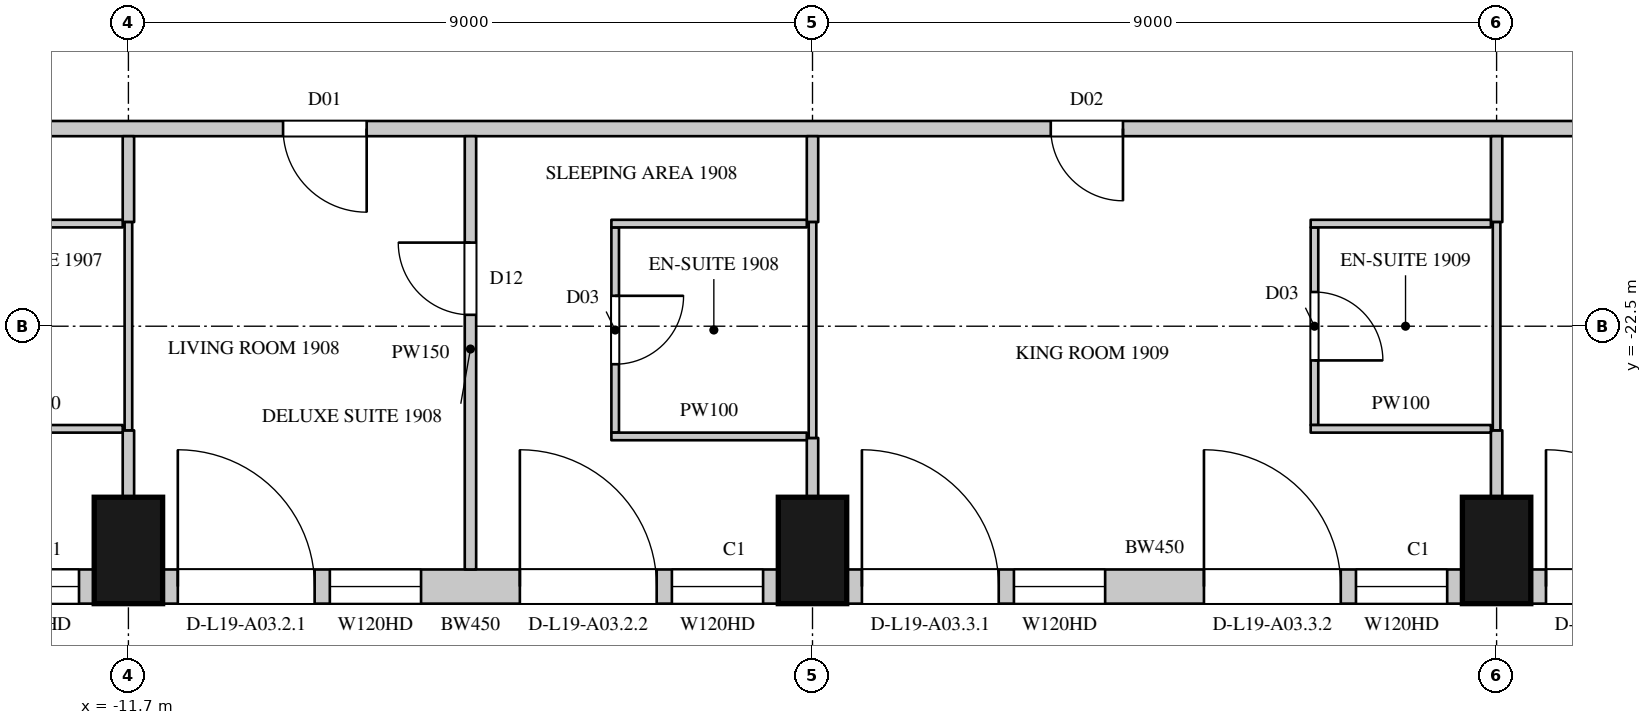
"""IFC4 building model, lengths in metres.
Left out: names, types, materials, properties, quantities, classifications, styles, units other than length and angle.
Written with IfcOpenShell. Run it as: python <this file> out.ifc"""

import sys

from ifc_helpers import new_model, si_unit, direction, frame, frame_2d, origin, origin_2d, place, context, subcontext, project, spatial, rectangle, extrude, element, fill, save


model = new_model("IFC4")
c1 = context("Model", 3, precision=1e-05, world=origin(), true_north=direction((0.0, 1.0)))
c2 = subcontext(c1, "Body", "Model", "MODEL_VIEW")
j1 = project(units=[si_unit("LENGTHUNIT", "METRE"), si_unit("PLANEANGLEUNIT", "RADIAN")], contexts=[c1])
p1 = place(None, origin())
s1 = spatial("IfcSite", under=j1, at=p1, CompositionType="ELEMENT")
p2 = place(p1, origin())
s2 = spatial("IfcBuilding", under=s1, at=p2, CompositionType="ELEMENT")
p3 = place(p2, frame((0.0, 0.0, 98.7)))
s3 = spatial("IfcBuildingStorey", under=s2, at=p3, CompositionType="ELEMENT", Elevation=98.7)
for number, where, z_axis, x_axis in (
    (1, (-11.7, -25.45, 0.0), (0.0, 0.0, 1.0), (1.0, 0.0, 0.0)),
    (2, (-2.7, -25.45, 0.0), (0.0, 0.0, 1.0), (1.0, 0.0, 0.0)),
    (3, (6.3, -25.45, 0.0), (0.0, 0.0, 1.0), (1.0, 0.0, 0.0)),
):
    element("IfcColumn", number, at=place(p3, frame(where, z_axis=z_axis, x_axis=x_axis)), inside=s3, PredefinedType="COLUMN", context=c2, shape_type="SweptSolid", body=[
        extrude(rectangle(XDim=0.9, YDim=1.4, at=origin_2d()), origin(), (0.0, 0.0, 1.0), 3.6),
    ])
p4 = place(p3, frame((-20.25, -25.925, 0.0), z_axis=(0.0, 0.0, 1.0), x_axis=(1.0, 0.0, 0.0)))
e4 = element("IfcWall", 4, at=p4, inside=s3, PredefinedType="SOLIDWALL", context=c2, shape_type="SweptSolid", body=[
    extrude(rectangle(XDim=8.1, YDim=0.45, at=frame_2d((4.05, 0.0))), origin(), (0.0, 0.0, 1.0), 3.3),
])
p5 = place(p4, frame((0.2, 0.0, 0.0)))
e5 = element("IfcOpeningElement", 5, at=p5, cuts=e4, PredefinedType="OPENING", context=c2, shape_type="SweptSolid", body=[
    extrude(rectangle(XDim=1.8, YDim=2.4, at=frame_2d((0.9, 1.2))), frame((0.0, 0.235, 0.0), z_axis=(0.0, -1.0, 0.0), x_axis=(1.0, 0.0, 0.0)), (0.0, 0.0, 1.0), 0.47),
])
p6 = place(p4, frame((2.2, 0.0, 1.05)))
e6 = element("IfcOpeningElement", 6, at=p6, cuts=e4, PredefinedType="OPENING", context=c2, shape_type="SweptSolid", body=[
    extrude(rectangle(XDim=1.2, YDim=2.0, at=frame_2d((0.6, 1.0))), frame((0.0, 0.235, 0.0), z_axis=(0.0, -1.0, 0.0), x_axis=(1.0, 0.0, 0.0)), (0.0, 0.0, 1.0), 0.47),
])
p7 = place(p4, frame((4.7, 0.0, 0.0)))
e7 = element("IfcOpeningElement", 7, at=p7, cuts=e4, PredefinedType="OPENING", context=c2, shape_type="SweptSolid", body=[
    extrude(rectangle(XDim=1.8, YDim=2.4, at=frame_2d((0.9, 1.2))), frame((0.0, 0.235, 0.0), z_axis=(0.0, -1.0, 0.0), x_axis=(1.0, 0.0, 0.0)), (0.0, 0.0, 1.0), 0.47),
])
p8 = place(p4, frame((6.7, 0.0, 1.05)))
e8 = element("IfcOpeningElement", 8, at=p8, cuts=e4, PredefinedType="OPENING", context=c2, shape_type="SweptSolid", body=[
    extrude(rectangle(XDim=1.2, YDim=2.0, at=frame_2d((0.6, 1.0))), frame((0.0, 0.235, 0.0), z_axis=(0.0, -1.0, 0.0), x_axis=(1.0, 0.0, 0.0)), (0.0, 0.0, 1.0), 0.47),
])
p9 = place(p3, frame((-11.25, -25.925, 0.0), z_axis=(0.0, 0.0, 1.0), x_axis=(1.0, 0.0, 0.0)))
e9 = element("IfcWall", 9, at=p9, inside=s3, PredefinedType="SOLIDWALL", context=c2, shape_type="SweptSolid", body=[
    extrude(rectangle(XDim=8.1, YDim=0.45, at=frame_2d((4.05, 0.0))), origin(), (0.0, 0.0, 1.0), 3.3),
])
p10 = place(p9, frame((0.2, 0.0, 0.0)))
e10 = element("IfcOpeningElement", 10, at=p10, cuts=e9, PredefinedType="OPENING", context=c2, shape_type="SweptSolid", body=[
    extrude(rectangle(XDim=1.8, YDim=2.4, at=frame_2d((0.9, 1.2))), frame((0.0, 0.235, 0.0), z_axis=(0.0, -1.0, 0.0), x_axis=(1.0, 0.0, 0.0)), (0.0, 0.0, 1.0), 0.47),
])
p11 = place(p9, frame((2.2, 0.0, 1.05)))
e11 = element("IfcOpeningElement", 11, at=p11, cuts=e9, PredefinedType="OPENING", context=c2, shape_type="SweptSolid", body=[
    extrude(rectangle(XDim=1.2, YDim=2.0, at=frame_2d((0.6, 1.0))), frame((0.0, 0.235, 0.0), z_axis=(0.0, -1.0, 0.0), x_axis=(1.0, 0.0, 0.0)), (0.0, 0.0, 1.0), 0.47),
])
p12 = place(p9, frame((4.7, 0.0, 0.0)))
e12 = element("IfcOpeningElement", 12, at=p12, cuts=e9, PredefinedType="OPENING", context=c2, shape_type="SweptSolid", body=[
    extrude(rectangle(XDim=1.8, YDim=2.4, at=frame_2d((0.9, 1.2))), frame((0.0, 0.235, 0.0), z_axis=(0.0, -1.0, 0.0), x_axis=(1.0, 0.0, 0.0)), (0.0, 0.0, 1.0), 0.47),
])
p13 = place(p9, frame((6.7, 0.0, 1.05)))
e13 = element("IfcOpeningElement", 13, at=p13, cuts=e9, PredefinedType="OPENING", context=c2, shape_type="SweptSolid", body=[
    extrude(rectangle(XDim=1.2, YDim=2.0, at=frame_2d((0.6, 1.0))), frame((0.0, 0.235, 0.0), z_axis=(0.0, -1.0, 0.0), x_axis=(1.0, 0.0, 0.0)), (0.0, 0.0, 1.0), 0.47),
])
p14 = place(p3, frame((-2.25, -25.925, 0.0), z_axis=(0.0, 0.0, 1.0), x_axis=(1.0, 0.0, 0.0)))
e14 = element("IfcWall", 14, at=p14, inside=s3, PredefinedType="SOLIDWALL", context=c2, shape_type="SweptSolid", body=[
    extrude(rectangle(XDim=8.1, YDim=0.45, at=frame_2d((4.05, 0.0))), origin(), (0.0, 0.0, 1.0), 3.3),
])
p15 = place(p14, frame((0.2, 0.0, 0.0)))
e15 = element("IfcOpeningElement", 15, at=p15, cuts=e14, PredefinedType="OPENING", context=c2, shape_type="SweptSolid", body=[
    extrude(rectangle(XDim=1.8, YDim=2.4, at=frame_2d((0.9, 1.2))), frame((0.0, 0.235, 0.0), z_axis=(0.0, -1.0, 0.0), x_axis=(1.0, 0.0, 0.0)), (0.0, 0.0, 1.0), 0.47),
])
p16 = place(p14, frame((2.2, 0.0, 1.05)))
e16 = element("IfcOpeningElement", 16, at=p16, cuts=e14, PredefinedType="OPENING", context=c2, shape_type="SweptSolid", body=[
    extrude(rectangle(XDim=1.2, YDim=2.0, at=frame_2d((0.6, 1.0))), frame((0.0, 0.235, 0.0), z_axis=(0.0, -1.0, 0.0), x_axis=(1.0, 0.0, 0.0)), (0.0, 0.0, 1.0), 0.47),
])
p17 = place(p14, frame((4.7, 0.0, 0.0)))
e17 = element("IfcOpeningElement", 17, at=p17, cuts=e14, PredefinedType="OPENING", context=c2, shape_type="SweptSolid", body=[
    extrude(rectangle(XDim=1.8, YDim=2.4, at=frame_2d((0.9, 1.2))), frame((0.0, 0.235, 0.0), z_axis=(0.0, -1.0, 0.0), x_axis=(1.0, 0.0, 0.0)), (0.0, 0.0, 1.0), 0.47),
])
p18 = place(p14, frame((6.7, 0.0, 1.05)))
e18 = element("IfcOpeningElement", 18, at=p18, cuts=e14, PredefinedType="OPENING", context=c2, shape_type="SweptSolid", body=[
    extrude(rectangle(XDim=1.2, YDim=2.0, at=frame_2d((0.6, 1.0))), frame((0.0, 0.235, 0.0), z_axis=(0.0, -1.0, 0.0), x_axis=(1.0, 0.0, 0.0)), (0.0, 0.0, 1.0), 0.47),
])
p19 = place(p3, frame((6.75, -25.925, 0.0), z_axis=(0.0, 0.0, 1.0), x_axis=(1.0, 0.0, 0.0)))
e19 = element("IfcWall", 19, at=p19, inside=s3, PredefinedType="SOLIDWALL", context=c2, shape_type="SweptSolid", body=[
    extrude(rectangle(XDim=8.1, YDim=0.45, at=frame_2d((4.05, 0.0))), origin(), (0.0, 0.0, 1.0), 3.3),
])
p20 = place(p19, frame((0.2, 0.0, 0.0)))
e20 = element("IfcOpeningElement", 20, at=p20, cuts=e19, PredefinedType="OPENING", context=c2, shape_type="SweptSolid", body=[
    extrude(rectangle(XDim=1.8, YDim=2.4, at=frame_2d((0.9, 1.2))), frame((0.0, 0.235, 0.0), z_axis=(0.0, -1.0, 0.0), x_axis=(1.0, 0.0, 0.0)), (0.0, 0.0, 1.0), 0.47),
])
p21 = place(p19, frame((2.2, 0.0, 1.05)))
e21 = element("IfcOpeningElement", 21, at=p21, cuts=e19, PredefinedType="OPENING", context=c2, shape_type="SweptSolid", body=[
    extrude(rectangle(XDim=1.2, YDim=2.0, at=frame_2d((0.6, 1.0))), frame((0.0, 0.235, 0.0), z_axis=(0.0, -1.0, 0.0), x_axis=(1.0, 0.0, 0.0)), (0.0, 0.0, 1.0), 0.47),
])
p22 = place(p19, frame((5.9, 0.0, 0.0)))
e22 = element("IfcOpeningElement", 22, at=p22, cuts=e19, PredefinedType="OPENING", context=c2, shape_type="SweptSolid", body=[
    extrude(rectangle(XDim=1.8, YDim=2.4, at=frame_2d((0.9, 1.2))), frame((0.0, 0.235, 0.0), z_axis=(0.0, -1.0, 0.0), x_axis=(1.0, 0.0, 0.0)), (0.0, 0.0, 1.0), 0.47),
])
p23 = place(p3, frame((-23.765, -19.9, 0.0), z_axis=(0.0, 0.0, 1.0), x_axis=(1.0, 0.0, 0.0)))
e23 = element("IfcWall", 23, at=p23, inside=s3, PredefinedType="PARTITIONING", context=c2, shape_type="SweptSolid", body=[
    extrude(rectangle(XDim=42.125, YDim=0.2, at=frame_2d((21.063, 0.0))), origin(), (0.0, 0.0, 1.0), 3.3),
])
p24 = place(p23, frame((6.2, 0.0, 0.0)))
e24 = element("IfcOpeningElement", 24, at=p24, cuts=e23, PredefinedType="OPENING", context=c2, shape_type="SweptSolid", body=[
    extrude(rectangle(XDim=0.95, YDim=2.2, at=frame_2d((0.475, 1.1))), frame((0.0, 0.11, 0.0), z_axis=(0.0, -1.0, 0.0), x_axis=(1.0, 0.0, 0.0)), (0.0, 0.0, 1.0), 0.22),
])
p25 = place(p23, frame((14.1, 0.0, 0.0)))
e25 = element("IfcOpeningElement", 25, at=p25, cuts=e23, PredefinedType="OPENING", context=c2, shape_type="SweptSolid", body=[
    extrude(rectangle(XDim=1.1, YDim=2.4, at=frame_2d((0.55, 1.2))), frame((0.0, 0.11, 0.0), z_axis=(0.0, -1.0, 0.0), x_axis=(1.0, 0.0, 0.0)), (0.0, 0.0, 1.0), 0.22),
])
p26 = place(p23, frame((24.2, 0.0, 0.0)))
e26 = element("IfcOpeningElement", 26, at=p26, cuts=e23, PredefinedType="OPENING", context=c2, shape_type="SweptSolid", body=[
    extrude(rectangle(XDim=0.95, YDim=2.2, at=frame_2d((0.475, 1.1))), frame((0.0, 0.11, 0.0), z_axis=(0.0, -1.0, 0.0), x_axis=(1.0, 0.0, 0.0)), (0.0, 0.0, 1.0), 0.22),
])
p27 = place(p23, frame((32.9, 0.0, 0.0)))
e27 = element("IfcOpeningElement", 27, at=p27, cuts=e23, PredefinedType="OPENING", context=c2, shape_type="SweptSolid", body=[
    extrude(rectangle(XDim=1.1, YDim=2.4, at=frame_2d((0.55, 1.2))), frame((0.0, 0.11, 0.0), z_axis=(0.0, -1.0, 0.0), x_axis=(1.0, 0.0, 0.0)), (0.0, 0.0, 1.0), 0.22),
])
p28 = place(p3, frame((-11.7, -24.75, 0.0), z_axis=(0.0, 0.0, 1.0), x_axis=(0.0, 1.0, 0.0)))
e28 = element("IfcWall", 28, at=p28, inside=s3, PredefinedType="PARTITIONING", context=c2, shape_type="SweptSolid", body=[
    extrude(rectangle(XDim=0.88, YDim=0.15, at=frame_2d((0.44, 0.0))), origin(), (0.0, 0.0, 1.0), 2.75),
])
p29 = place(p3, frame((-11.7, -21.13, 0.0), z_axis=(0.0, 0.0, 1.0), x_axis=(0.0, 1.0, 0.0)))
e29 = element("IfcWall", 29, at=p29, inside=s3, PredefinedType="PARTITIONING", context=c2, shape_type="SweptSolid", body=[
    extrude(rectangle(XDim=1.13, YDim=0.15, at=frame_2d((0.565, 0.0))), origin(), (0.0, 0.0, 1.0), 2.75),
])
p30 = place(p3, frame((-7.2, -25.7, 0.0), z_axis=(0.0, 0.0, 1.0), x_axis=(0.0, 1.0, 0.0)))
e30 = element("IfcWall", 30, at=p30, inside=s3, PredefinedType="PARTITIONING", context=c2, shape_type="SweptSolid", body=[
    extrude(rectangle(XDim=5.7, YDim=0.15, at=frame_2d((2.85, 0.0))), origin(), (0.0, 0.0, 1.0), 2.65),
])
p31 = place(p30, frame((3.35, 0.0, 0.0)))
e31 = element("IfcOpeningElement", 31, at=p31, cuts=e30, PredefinedType="OPENING", context=c2, shape_type="SweptSolid", body=[
    extrude(rectangle(XDim=0.95, YDim=2.2, at=frame_2d((0.475, 1.1))), frame((0.0, 0.085, 0.0), z_axis=(0.0, -1.0, 0.0), x_axis=(1.0, 0.0, 0.0)), (0.0, 0.0, 1.0), 0.17),
])
p32 = place(p3, frame((-2.7, -24.75, 0.0), z_axis=(0.0, 0.0, 1.0), x_axis=(0.0, 1.0, 0.0)))
e32 = element("IfcWall", 32, at=p32, inside=s3, PredefinedType="PARTITIONING", context=c2, shape_type="SweptSolid", body=[
    extrude(rectangle(XDim=0.78, YDim=0.15, at=frame_2d((0.39, 0.0))), origin(), (0.0, 0.0, 1.0), 2.75),
])
p33 = place(p3, frame((-2.7, -21.13, 0.0), z_axis=(0.0, 0.0, 1.0), x_axis=(0.0, 1.0, 0.0)))
e33 = element("IfcWall", 33, at=p33, inside=s3, PredefinedType="PARTITIONING", context=c2, shape_type="SweptSolid", body=[
    extrude(rectangle(XDim=1.13, YDim=0.15, at=frame_2d((0.565, 0.0))), origin(), (0.0, 0.0, 1.0), 2.75),
])
p34 = place(p3, frame((6.3, -24.75, 0.0), z_axis=(0.0, 0.0, 1.0), x_axis=(0.0, 1.0, 0.0)))
e34 = element("IfcWall", 34, at=p34, inside=s3, PredefinedType="PARTITIONING", context=c2, shape_type="SweptSolid", body=[
    extrude(rectangle(XDim=0.88, YDim=0.15, at=frame_2d((0.44, 0.0))), origin(), (0.0, 0.0, 1.0), 2.75),
])
p35 = place(p3, frame((6.3, -21.13, 0.0), z_axis=(0.0, 0.0, 1.0), x_axis=(0.0, 1.0, 0.0)))
e35 = element("IfcWall", 35, at=p35, inside=s3, PredefinedType="PARTITIONING", context=c2, shape_type="SweptSolid", body=[
    extrude(rectangle(XDim=1.13, YDim=0.15, at=frame_2d((0.565, 0.0))), origin(), (0.0, 0.0, 1.0), 2.75),
])
for number, where, z_axis, x_axis in (
    (36, (-14.146, -23.85, 0.0), (0.0, 0.0, 1.0), (1.0, 0.0, 0.0)),
    (37, (-14.146, -21.15, 0.0), (0.0, 0.0, 1.0), (1.0, 0.0, 0.0)),
):
    element("IfcWall", number, at=place(p3, frame(where, z_axis=z_axis, x_axis=x_axis)), inside=s3, PredefinedType="PARTITIONING", context=c2, shape_type="SweptSolid", body=[
        extrude(rectangle(XDim=2.371, YDim=0.1, at=frame_2d((1.186, 0.0))), origin(), (0.0, 0.0, 1.0), 3.3),
    ])
p36 = place(p3, frame((-11.7, -23.87, 0.0), z_axis=(0.0, 0.0, 1.0), x_axis=(0.0, 1.0, 0.0)))
e38 = element("IfcWall", 38, at=p36, inside=s3, PredefinedType="PARTITIONING", context=c2, shape_type="SweptSolid", body=[
    extrude(rectangle(XDim=2.74, YDim=0.1, at=frame_2d((1.37, 0.0))), origin(), (0.0, 0.0, 1.0), 2.75),
])
p37 = place(p3, frame((-5.296, -23.9, 0.0), z_axis=(0.0, 0.0, 1.0), x_axis=(0.0, 1.0, 0.0)))
e39 = element("IfcWall", 39, at=p37, inside=s3, PredefinedType="PARTITIONING", context=c2, shape_type="SweptSolid", body=[
    extrude(rectangle(XDim=2.7, YDim=0.1, at=frame_2d((1.35, 0.0))), origin(), (0.0, 0.0, 1.0), 3.3),
])
p38 = place(p37, frame((0.9, 0.0, 0.0)))
e40 = element("IfcOpeningElement", 40, at=p38, cuts=e39, PredefinedType="OPENING", context=c2, shape_type="SweptSolid", body=[
    extrude(rectangle(XDim=0.9, YDim=2.2, at=frame_2d((0.45, 1.1))), frame((0.0, 0.06, 0.0), z_axis=(0.0, -1.0, 0.0), x_axis=(1.0, 0.0, 0.0)), (0.0, 0.0, 1.0), 0.12),
])
for number, where, z_axis, x_axis in (
    (41, (-5.346, -23.95, 0.0), (0.0, 0.0, 1.0), (1.0, 0.0, 0.0)),
    (42, (-5.346, -21.15, 0.0), (0.0, 0.0, 1.0), (1.0, 0.0, 0.0)),
):
    element("IfcWall", number, at=place(p3, frame(where, z_axis=z_axis, x_axis=x_axis)), inside=s3, PredefinedType="PARTITIONING", context=c2, shape_type="SweptSolid", body=[
        extrude(rectangle(XDim=2.571, YDim=0.1, at=frame_2d((1.286, 0.0))), origin(), (0.0, 0.0, 1.0), 3.3),
    ])
p39 = place(p3, frame((-2.7, -23.97, 0.0), z_axis=(0.0, 0.0, 1.0), x_axis=(0.0, 1.0, 0.0)))
e43 = element("IfcWall", 43, at=p39, inside=s3, PredefinedType="PARTITIONING", context=c2, shape_type="SweptSolid", body=[
    extrude(rectangle(XDim=2.84, YDim=0.1, at=frame_2d((1.42, 0.0))), origin(), (0.0, 0.0, 1.0), 2.75),
])
p40 = place(p3, frame((3.904, -23.8, 0.0), z_axis=(0.0, 0.0, 1.0), x_axis=(0.0, 1.0, 0.0)))
e44 = element("IfcWall", 44, at=p40, inside=s3, PredefinedType="PARTITIONING", context=c2, shape_type="SweptSolid", body=[
    extrude(rectangle(XDim=2.6, YDim=0.1, at=frame_2d((1.3, 0.0))), origin(), (0.0, 0.0, 1.0), 3.3),
])
p41 = place(p40, frame((0.85, 0.0, 0.0)))
e45 = element("IfcOpeningElement", 45, at=p41, cuts=e44, PredefinedType="OPENING", context=c2, shape_type="SweptSolid", body=[
    extrude(rectangle(XDim=0.9, YDim=2.2, at=frame_2d((0.45, 1.1))), frame((0.0, 0.06, 0.0), z_axis=(0.0, -1.0, 0.0), x_axis=(1.0, 0.0, 0.0)), (0.0, 0.0, 1.0), 0.12),
])
for number, where, z_axis, x_axis in (
    (46, (3.854, -23.85, 0.0), (0.0, 0.0, 1.0), (1.0, 0.0, 0.0)),
    (47, (3.854, -21.15, 0.0), (0.0, 0.0, 1.0), (1.0, 0.0, 0.0)),
):
    element("IfcWall", number, at=place(p3, frame(where, z_axis=z_axis, x_axis=x_axis)), inside=s3, PredefinedType="PARTITIONING", context=c2, shape_type="SweptSolid", body=[
        extrude(rectangle(XDim=2.371, YDim=0.1, at=frame_2d((1.186, 0.0))), origin(), (0.0, 0.0, 1.0), 3.3),
    ])
p42 = place(p3, frame((6.3, -23.87, 0.0), z_axis=(0.0, 0.0, 1.0), x_axis=(0.0, 1.0, 0.0)))
e48 = element("IfcWall", 48, at=p42, inside=s3, PredefinedType="PARTITIONING", context=c2, shape_type="SweptSolid", body=[
    extrude(rectangle(XDim=2.74, YDim=0.1, at=frame_2d((1.37, 0.0))), origin(), (0.0, 0.0, 1.0), 2.75),
])
p43 = place(p8, origin())
e49 = element("IfcWindow", 49, at=p43, inside=s3, PartitioningType="SINGLE_PANEL", PredefinedType="WINDOW", context=c2, shape_type="SweptSolid", body=[
    extrude(rectangle(XDim=1.2, YDim=2.0, at=frame_2d((0.6, 1.0))), frame((0.0, 0.135, 0.0), z_axis=(0.0, -1.0, 0.0), x_axis=(1.0, 0.0, 0.0)), (0.0, 0.0, 1.0), 0.06),
])
fill(e8, e49)
p44 = place(p10, origin())
e50 = element("IfcDoor", 50, at=p44, inside=s3, OperationType="SLIDING_TO_LEFT", PredefinedType="DOOR", context=c2, shape_type="SweptSolid", body=[
    extrude(rectangle(XDim=1.8, YDim=2.4, at=frame_2d((0.9, 1.2))), frame((0.0, 0.13, 0.0), z_axis=(0.0, -1.0, 0.0), x_axis=(1.0, 0.0, 0.0)), (0.0, 0.0, 1.0), 0.05),
])
fill(e10, e50)
p45 = place(p11, origin())
e51 = element("IfcWindow", 51, at=p45, inside=s3, PartitioningType="SINGLE_PANEL", PredefinedType="WINDOW", context=c2, shape_type="SweptSolid", body=[
    extrude(rectangle(XDim=1.2, YDim=2.0, at=frame_2d((0.6, 1.0))), frame((0.0, 0.135, 0.0), z_axis=(0.0, -1.0, 0.0), x_axis=(1.0, 0.0, 0.0)), (0.0, 0.0, 1.0), 0.06),
])
fill(e11, e51)
p46 = place(p12, origin())
e52 = element("IfcDoor", 52, at=p46, inside=s3, OperationType="SLIDING_TO_LEFT", PredefinedType="DOOR", context=c2, shape_type="SweptSolid", body=[
    extrude(rectangle(XDim=1.8, YDim=2.4, at=frame_2d((0.9, 1.2))), frame((0.0, 0.13, 0.0), z_axis=(0.0, -1.0, 0.0), x_axis=(1.0, 0.0, 0.0)), (0.0, 0.0, 1.0), 0.05),
])
fill(e12, e52)
p47 = place(p13, origin())
e53 = element("IfcWindow", 53, at=p47, inside=s3, PartitioningType="SINGLE_PANEL", PredefinedType="WINDOW", context=c2, shape_type="SweptSolid", body=[
    extrude(rectangle(XDim=1.2, YDim=2.0, at=frame_2d((0.6, 1.0))), frame((0.0, 0.135, 0.0), z_axis=(0.0, -1.0, 0.0), x_axis=(1.0, 0.0, 0.0)), (0.0, 0.0, 1.0), 0.06),
])
fill(e13, e53)
p48 = place(p15, origin())
e54 = element("IfcDoor", 54, at=p48, inside=s3, OperationType="SLIDING_TO_LEFT", PredefinedType="DOOR", context=c2, shape_type="SweptSolid", body=[
    extrude(rectangle(XDim=1.8, YDim=2.4, at=frame_2d((0.9, 1.2))), frame((0.0, 0.13, 0.0), z_axis=(0.0, -1.0, 0.0), x_axis=(1.0, 0.0, 0.0)), (0.0, 0.0, 1.0), 0.05),
])
fill(e15, e54)
p49 = place(p16, origin())
e55 = element("IfcWindow", 55, at=p49, inside=s3, PartitioningType="SINGLE_PANEL", PredefinedType="WINDOW", context=c2, shape_type="SweptSolid", body=[
    extrude(rectangle(XDim=1.2, YDim=2.0, at=frame_2d((0.6, 1.0))), frame((0.0, 0.135, 0.0), z_axis=(0.0, -1.0, 0.0), x_axis=(1.0, 0.0, 0.0)), (0.0, 0.0, 1.0), 0.06),
])
fill(e16, e55)
p50 = place(p17, origin())
e56 = element("IfcDoor", 56, at=p50, inside=s3, OperationType="SLIDING_TO_LEFT", PredefinedType="DOOR", context=c2, shape_type="SweptSolid", body=[
    extrude(rectangle(XDim=1.8, YDim=2.4, at=frame_2d((0.9, 1.2))), frame((0.0, 0.13, 0.0), z_axis=(0.0, -1.0, 0.0), x_axis=(1.0, 0.0, 0.0)), (0.0, 0.0, 1.0), 0.05),
])
fill(e17, e56)
p51 = place(p18, origin())
e57 = element("IfcWindow", 57, at=p51, inside=s3, PartitioningType="SINGLE_PANEL", PredefinedType="WINDOW", context=c2, shape_type="SweptSolid", body=[
    extrude(rectangle(XDim=1.2, YDim=2.0, at=frame_2d((0.6, 1.0))), frame((0.0, 0.135, 0.0), z_axis=(0.0, -1.0, 0.0), x_axis=(1.0, 0.0, 0.0)), (0.0, 0.0, 1.0), 0.06),
])
fill(e18, e57)
p52 = place(p20, origin())
e58 = element("IfcDoor", 58, at=p52, inside=s3, OperationType="SLIDING_TO_LEFT", PredefinedType="DOOR", context=c2, shape_type="SweptSolid", body=[
    extrude(rectangle(XDim=1.8, YDim=2.4, at=frame_2d((0.9, 1.2))), frame((0.0, 0.13, 0.0), z_axis=(0.0, -1.0, 0.0), x_axis=(1.0, 0.0, 0.0)), (0.0, 0.0, 1.0), 0.05),
])
fill(e20, e58)
p53 = place(p25, origin())
e59 = element("IfcDoor", 59, at=p53, inside=s3, OperationType="SINGLE_SWING_LEFT", PredefinedType="DOOR", context=c2, shape_type="SweptSolid", body=[
    extrude(rectangle(XDim=1.1, YDim=2.4, at=frame_2d((0.55, 1.2))), frame((0.0, 0.025, 0.0), z_axis=(0.0, -1.0, 0.0), x_axis=(1.0, 0.0, 0.0)), (0.0, 0.0, 1.0), 0.05),
])
fill(e25, e59)
p54 = place(p31, origin())
e60 = element("IfcDoor", 60, at=p54, inside=s3, OperationType="SINGLE_SWING_RIGHT", PredefinedType="DOOR", context=c2, shape_type="SweptSolid", body=[
    extrude(rectangle(XDim=0.95, YDim=2.2, at=frame_2d((0.475, 1.1))), frame((0.0, 0.025, 0.0), z_axis=(0.0, -1.0, 0.0), x_axis=(1.0, 0.0, 0.0)), (0.0, 0.0, 1.0), 0.05),
])
fill(e31, e60)
p55 = place(p38, origin())
e61 = element("IfcDoor", 61, at=p55, inside=s3, OperationType="SINGLE_SWING_LEFT", PredefinedType="DOOR", context=c2, shape_type="SweptSolid", body=[
    extrude(rectangle(XDim=0.9, YDim=2.2, at=frame_2d((0.45, 1.1))), frame((0.0, 0.025, 0.0), z_axis=(0.0, -1.0, 0.0), x_axis=(1.0, 0.0, 0.0)), (0.0, 0.0, 1.0), 0.05),
])
fill(e40, e61)
p56 = place(p26, origin())
e62 = element("IfcDoor", 62, at=p56, inside=s3, OperationType="SINGLE_SWING_LEFT", PredefinedType="DOOR", context=c2, shape_type="SweptSolid", body=[
    extrude(rectangle(XDim=0.95, YDim=2.2, at=frame_2d((0.475, 1.1))), frame((0.0, 0.025, 0.0), z_axis=(0.0, -1.0, 0.0), x_axis=(1.0, 0.0, 0.0)), (0.0, 0.0, 1.0), 0.05),
])
fill(e26, e62)
p57 = place(p41, origin())
e63 = element("IfcDoor", 63, at=p57, inside=s3, OperationType="SINGLE_SWING_RIGHT", PredefinedType="DOOR", context=c2, shape_type="SweptSolid", body=[
    extrude(rectangle(XDim=0.9, YDim=2.2, at=frame_2d((0.45, 1.1))), frame((0.0, 0.025, 0.0), z_axis=(0.0, -1.0, 0.0), x_axis=(1.0, 0.0, 0.0)), (0.0, 0.0, 1.0), 0.05),
])
fill(e45, e63)
save(model, sys.argv[1])
